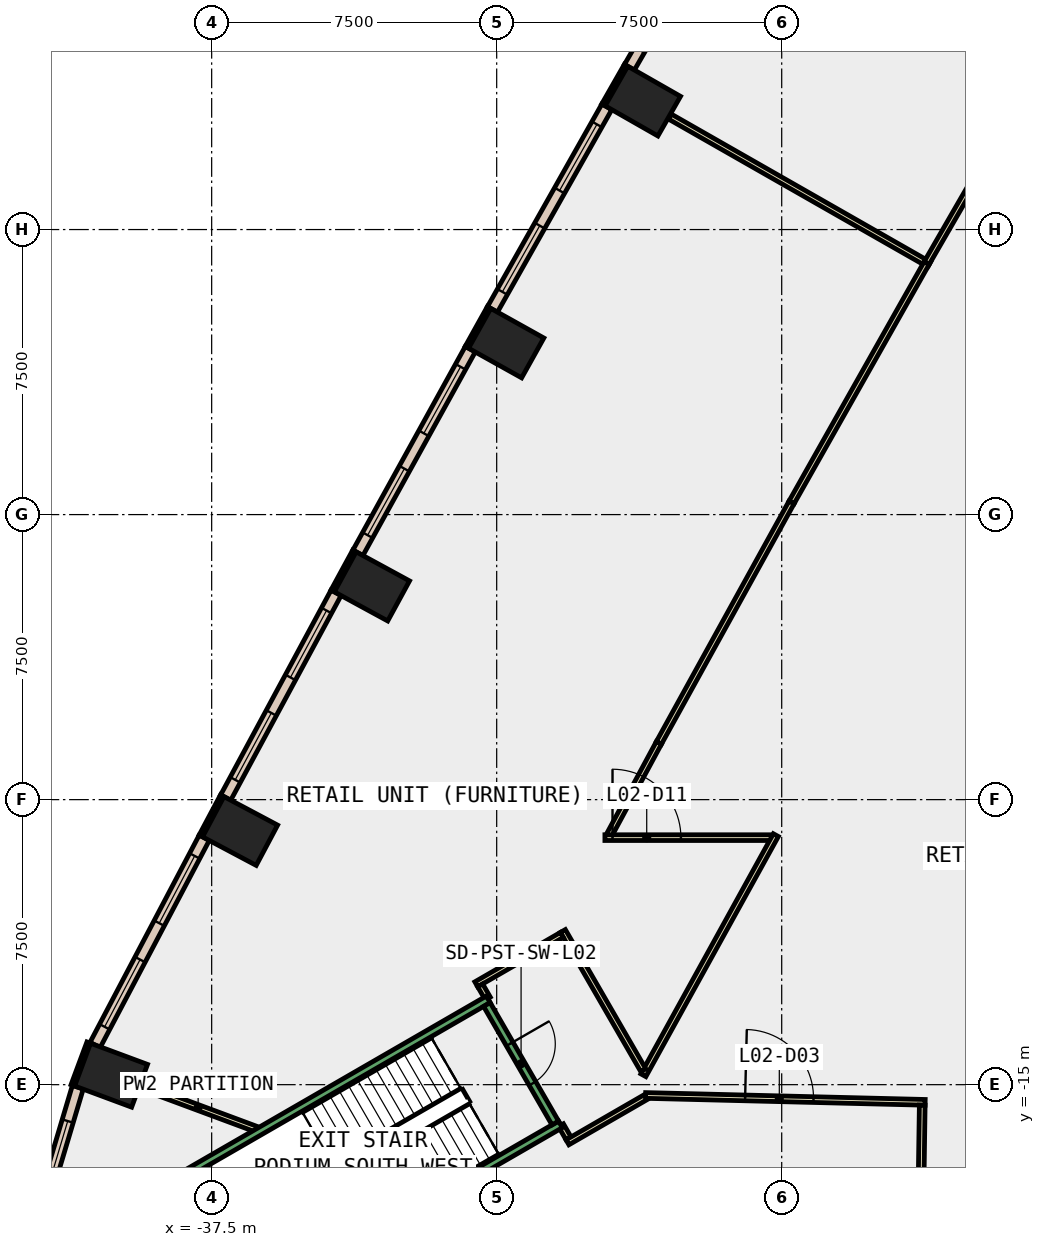
"""IFC4 building model, lengths in metres.
Left out: names, types, materials, properties, quantities, classifications, styles, units other than length and angle.
Written with IfcOpenShell. Run it as: python <this file> out.ifc"""

import sys

from ifc_helpers import new_model, si_unit, direction, frame, frame_2d, origin, origin_2d, place, context, subcontext, project, spatial, rectangle, extrude, element, fill, save


model = new_model("IFC4")
c1 = context("Model", 3, precision=1e-05, world=origin(), true_north=direction((0.0, 1.0)))
c2 = subcontext(c1, "Body", "Model", "MODEL_VIEW")
j1 = project(units=[si_unit("LENGTHUNIT", "METRE"), si_unit("PLANEANGLEUNIT", "RADIAN")], contexts=[c1])
p1 = place(None, origin())
s1 = spatial("IfcSite", under=j1, at=p1, CompositionType="ELEMENT")
p2 = place(p1, origin())
s2 = spatial("IfcBuilding", under=s1, at=p2, CompositionType="ELEMENT")
p3 = place(p2, frame((0.0, 0.0, 15.0)))
s3 = spatial("IfcBuildingStorey", under=s2, at=p3, CompositionType="ELEMENT", Elevation=15.0)
for number, where, z_axis, x_axis in (
    (1, (-26.155, 10.88, -0.45), (0.0, 0.0, 1.0), (0.496, 0.869, 0.0)),
    (2, (-29.75, 4.512, -0.45), (0.0, 0.0, 1.0), (0.487, 0.873, 0.0)),
    (3, (-33.283, -1.889, -0.45), (0.0, 0.0, 1.0), (0.478, 0.878, 0.0)),
    (4, (-36.753, -8.325, -0.45), (0.0, 0.0, 1.0), (0.469, 0.883, 0.0)),
    (5, (-40.147, -14.751, -0.45), (0.0, 0.0, 1.0), (0.348, 0.937, 0.0)),
):
    element("IfcColumn", number, at=place(p3, frame(where, z_axis=z_axis, x_axis=x_axis)), inside=s3, PredefinedType="COLUMN", context=c2, shape_type="SweptSolid", body=[
        extrude(rectangle(XDim=1.2, YDim=1.6, at=origin_2d()), origin(), (0.0, 0.0, 1.0), 5.0),
    ])
p4 = place(p3, frame((-26.596, 11.822, 0.0), z_axis=(0.0, 0.0, 1.0), x_axis=(-0.495854054996, -0.868405870629, 0.0)))
e6 = element("IfcWall", 6, at=p4, inside=s3, PredefinedType="STANDARD", context=c2, shape_type="SweptSolid", body=[
    extrude(rectangle(XDim=1.2, YDim=0.1, at=frame_2d((0.6, 0.0))), origin(), (0.0, 0.0, 1.0), 4.55),
])
p5 = place(p3, frame((-30.2, 5.45, 0.0), z_axis=(0.0, 0.0, 1.0), x_axis=(-0.486817526853, -0.873503689488, 0.0)))
e7 = element("IfcWall", 7, at=p5, inside=s3, PredefinedType="STANDARD", context=c2, shape_type="SweptSolid", body=[
    extrude(rectangle(XDim=1.2, YDim=0.1, at=frame_2d((0.6, 0.0))), origin(), (0.0, 0.0, 1.0), 4.55),
])
p6 = place(p3, frame((-33.742, -0.956, 0.0), z_axis=(0.0, 0.0, 1.0), x_axis=(-0.478267644701, -0.878214131082, 0.0)))
e8 = element("IfcWall", 8, at=p6, inside=s3, PredefinedType="STANDARD", context=c2, shape_type="SweptSolid", body=[
    extrude(rectangle(XDim=1.2, YDim=0.1, at=frame_2d((0.6, 0.0))), origin(), (0.0, 0.0, 1.0), 4.55),
])
p7 = place(p3, frame((-37.222, -7.397, 0.0), z_axis=(0.0, 0.0, 1.0), x_axis=(-0.469383408131, -0.882994459876, 0.0)))
e9 = element("IfcWall", 9, at=p7, inside=s3, PredefinedType="STANDARD", context=c2, shape_type="SweptSolid", body=[
    extrude(rectangle(XDim=1.199, YDim=0.1, at=frame_2d((0.6, 0.0))), origin(), (0.0, 0.0, 1.0), 4.55),
])
p8 = place(p3, frame((-40.735, -13.893, 0.0), z_axis=(0.0, 0.0, 1.0), x_axis=(-0.348268249601, -0.937394914814, 0.0)))
e10 = element("IfcWall", 10, at=p8, inside=s3, PredefinedType="STANDARD", context=c2, shape_type="SweptSolid", body=[
    extrude(rectangle(XDim=1.2, YDim=0.1, at=frame_2d((0.6, 0.0))), origin(), (0.0, 0.0, 1.0), 4.55),
])
p9 = place(p3, frame((-23.447, 17.071, 0.0), z_axis=(0.0, 0.0, 1.0), x_axis=(-0.499939977436, -0.866060055055, 0.0)))
e11 = element("IfcWall", 11, at=p9, inside=s3, PredefinedType="STANDARD", context=c2, shape_type="SweptSolid", body=[
    extrude(rectangle(XDim=6.121, YDim=0.3, at=frame_2d((3.061, 0.0))), origin(), (0.0, 0.0, 1.0), 4.55),
])
p10 = place(p9, frame((0.53, 0.0, 1.0)))
e12 = element("IfcOpeningElement", 12, at=p10, cuts=e11, PredefinedType="OPENING", context=c2, shape_type="SweptSolid", body=[
    extrude(rectangle(XDim=2.0, YDim=3.2, at=frame_2d((1.0, 1.6))), frame((0.0, 0.16, 0.0), z_axis=(0.0, -1.0, 0.0), x_axis=(1.0, 0.0, 0.0)), (0.0, 0.0, 1.0), 0.32),
])
p11 = place(p9, frame((3.591, 0.0, 1.0)))
e13 = element("IfcOpeningElement", 13, at=p11, cuts=e11, PredefinedType="OPENING", context=c2, shape_type="SweptSolid", body=[
    extrude(rectangle(XDim=2.0, YDim=3.2, at=frame_2d((1.0, 1.6))), frame((0.0, 0.16, 0.0), z_axis=(0.0, -1.0, 0.0), x_axis=(1.0, 0.0, 0.0)), (0.0, 0.0, 1.0), 0.32),
])
p12 = place(p3, frame((-27.101, 10.73, 0.0), z_axis=(0.0, 0.0, 1.0), x_axis=(-0.491661677717, -0.870786308267, 0.0)))
e14 = element("IfcWall", 14, at=p12, inside=s3, PredefinedType="STANDARD", context=c2, shape_type="SweptSolid", body=[
    extrude(rectangle(XDim=6.122, YDim=0.3, at=frame_2d((3.061, 0.0))), origin(), (0.0, 0.0, 1.0), 4.55),
])
p13 = place(p12, frame((0.531, 0.0, 1.0)))
e15 = element("IfcOpeningElement", 15, at=p13, cuts=e14, PredefinedType="OPENING", context=c2, shape_type="SweptSolid", body=[
    extrude(rectangle(XDim=2.0, YDim=3.2, at=frame_2d((1.0, 1.6))), frame((0.0, 0.16, 0.0), z_axis=(0.0, -1.0, 0.0), x_axis=(1.0, 0.0, 0.0)), (0.0, 0.0, 1.0), 0.32),
])
p14 = place(p12, frame((3.592, 0.0, 1.0)))
e16 = element("IfcOpeningElement", 16, at=p14, cuts=e14, PredefinedType="OPENING", context=c2, shape_type="SweptSolid", body=[
    extrude(rectangle(XDim=2.0, YDim=3.2, at=frame_2d((1.0, 1.6))), frame((0.0, 0.16, 0.0), z_axis=(0.0, -1.0, 0.0), x_axis=(1.0, 0.0, 0.0)), (0.0, 0.0, 1.0), 0.32),
])
p15 = place(p3, frame((-30.694, 4.353, 0.0), z_axis=(0.0, 0.0, 1.0), x_axis=(-0.483233380559, -0.875491576152, 0.0)))
e17 = element("IfcWall", 17, at=p15, inside=s3, PredefinedType="STANDARD", context=c2, shape_type="SweptSolid", body=[
    extrude(rectangle(XDim=6.121, YDim=0.3, at=frame_2d((3.061, 0.0))), origin(), (0.0, 0.0, 1.0), 4.55),
])
p16 = place(p15, frame((0.53, 0.0, 1.0)))
e18 = element("IfcOpeningElement", 18, at=p16, cuts=e17, PredefinedType="OPENING", context=c2, shape_type="SweptSolid", body=[
    extrude(rectangle(XDim=2.0, YDim=3.2, at=frame_2d((1.0, 1.6))), frame((0.0, 0.16, 0.0), z_axis=(0.0, -1.0, 0.0), x_axis=(1.0, 0.0, 0.0)), (0.0, 0.0, 1.0), 0.32),
])
p17 = place(p15, frame((3.591, 0.0, 1.0)))
e19 = element("IfcOpeningElement", 19, at=p17, cuts=e17, PredefinedType="OPENING", context=c2, shape_type="SweptSolid", body=[
    extrude(rectangle(XDim=2.0, YDim=3.2, at=frame_2d((1.0, 1.6))), frame((0.0, 0.16, 0.0), z_axis=(0.0, -1.0, 0.0), x_axis=(1.0, 0.0, 0.0)), (0.0, 0.0, 1.0), 0.32),
])
p18 = place(p3, frame((-34.226, -2.058, 0.0), z_axis=(0.0, 0.0, 1.0), x_axis=(-0.474584950749, -0.880209704856, 0.0)))
e20 = element("IfcWall", 20, at=p18, inside=s3, PredefinedType="STANDARD", context=c2, shape_type="SweptSolid", body=[
    extrude(rectangle(XDim=6.121, YDim=0.3, at=frame_2d((3.061, 0.0))), origin(), (0.0, 0.0, 1.0), 4.55),
])
p19 = place(p18, frame((0.53, 0.0, 1.0)))
e21 = element("IfcOpeningElement", 21, at=p19, cuts=e20, PredefinedType="OPENING", context=c2, shape_type="SweptSolid", body=[
    extrude(rectangle(XDim=2.0, YDim=3.2, at=frame_2d((1.0, 1.6))), frame((0.0, 0.16, 0.0), z_axis=(0.0, -1.0, 0.0), x_axis=(1.0, 0.0, 0.0)), (0.0, 0.0, 1.0), 0.32),
])
p20 = place(p18, frame((3.591, 0.0, 1.0)))
e22 = element("IfcOpeningElement", 22, at=p20, cuts=e20, PredefinedType="OPENING", context=c2, shape_type="SweptSolid", body=[
    extrude(rectangle(XDim=2.0, YDim=3.2, at=frame_2d((1.0, 1.6))), frame((0.0, 0.16, 0.0), z_axis=(0.0, -1.0, 0.0), x_axis=(1.0, 0.0, 0.0)), (0.0, 0.0, 1.0), 0.32),
])
p21 = place(p3, frame((-37.695, -8.503, 0.0), z_axis=(0.0, 0.0, 1.0), x_axis=(-0.466125129602, -0.884718804792, 0.0)))
e23 = element("IfcWall", 23, at=p21, inside=s3, PredefinedType="STANDARD", context=c2, shape_type="SweptSolid", body=[
    extrude(rectangle(XDim=6.164, YDim=0.3, at=frame_2d((3.082, 0.0))), origin(), (0.0, 0.0, 1.0), 4.55),
])
p22 = place(p21, frame((0.541, 0.0, 1.0)))
e24 = element("IfcOpeningElement", 24, at=p22, cuts=e23, PredefinedType="OPENING", context=c2, shape_type="SweptSolid", body=[
    extrude(rectangle(XDim=2.0, YDim=3.2, at=frame_2d((1.0, 1.6))), frame((0.0, 0.16, 0.0), z_axis=(0.0, -1.0, 0.0), x_axis=(1.0, 0.0, 0.0)), (0.0, 0.0, 1.0), 0.32),
])
p23 = place(p21, frame((3.623, 0.0, 1.0)))
e25 = element("IfcOpeningElement", 25, at=p23, cuts=e23, PredefinedType="OPENING", context=c2, shape_type="SweptSolid", body=[
    extrude(rectangle(XDim=2.0, YDim=3.2, at=frame_2d((1.0, 1.6))), frame((0.0, 0.16, 0.0), z_axis=(0.0, -1.0, 0.0), x_axis=(1.0, 0.0, 0.0)), (0.0, 0.0, 1.0), 0.32),
])
p24 = place(p3, frame((-41.022, -15.066, 0.0), z_axis=(0.0, 0.0, 1.0), x_axis=(-0.285800575124, -0.958289116738, 0.0)))
e26 = element("IfcWall", 26, at=p24, inside=s3, PredefinedType="STANDARD", context=c2, shape_type="SweptSolid", body=[
    extrude(rectangle(XDim=3.46, YDim=0.3, at=frame_2d((1.73, 0.0))), origin(), (0.0, 0.0, 1.0), 4.55),
])
p25 = place(p24, frame((0.93, 0.0, 1.0)))
e27 = element("IfcOpeningElement", 27, at=p25, cuts=e26, PredefinedType="OPENING", context=c2, shape_type="SweptSolid", body=[
    extrude(rectangle(XDim=1.6, YDim=3.2, at=frame_2d((0.8, 1.6))), frame((0.0, 0.16, 0.0), z_axis=(0.0, -1.0, 0.0), x_axis=(1.0, 0.0, 0.0)), (0.0, 0.0, 1.0), 0.32),
])
p26 = place(p3, frame((-39.378, -15.037, 0.0), z_axis=(0.0, 0.0, 1.0), x_axis=(0.937400028274, -0.348254485961, 0.0)))
e28 = element("IfcWall", 28, at=p26, inside=s3, PredefinedType="PARTITIONING", context=c2, shape_type="SweptSolid", body=[
    extrude(rectangle(XDim=3.247, YDim=0.15, at=frame_2d((1.624, 0.0))), origin(), (0.0, 0.0, 1.0), 4.55),
])
p27 = place(p3, frame((-28.309, -16.067, 0.0), z_axis=(0.0, 0.0, 1.0), x_axis=(0.499546646484, -0.86628698939, 0.0)))
e29 = element("IfcWall", 29, at=p27, inside=s3, PredefinedType="PARTITIONING", context=c2, shape_type="SweptSolid", body=[
    extrude(rectangle(XDim=0.401, YDim=0.15, at=frame_2d((0.2, 0.0))), origin(), (0.0, 0.0, 1.0), 4.55),
])
p28 = place(p3, frame((-28.137, -16.517, 0.0), z_axis=(0.0, 0.0, 1.0), x_axis=(0.865960610734, 0.500112208066, 0.0)))
e30 = element("IfcWall", 30, at=p28, inside=s3, PredefinedType="PARTITIONING", context=c2, shape_type="SweptSolid", body=[
    extrude(rectangle(XDim=2.386, YDim=0.15, at=frame_2d((1.193, 0.0))), origin(), (0.0, 0.0, 1.0), 4.55),
])
p29 = place(p3, frame((-26.081, -15.284, 0.0), z_axis=(0.0, 0.0, 1.0), x_axis=(0.999696822244, -0.02462242057, 0.0)))
e31 = element("IfcWall", 31, at=p29, inside=s3, PredefinedType="PARTITIONING", context=c2, shape_type="SweptSolid", body=[
    extrude(rectangle(XDim=7.357, YDim=0.15, at=frame_2d((3.679, 0.0))), origin(), (0.0, 0.0, 1.0), 4.55),
])
p30 = place(p29, frame((2.619, 0.0, 0.0)))
e32 = element("IfcOpeningElement", 32, at=p30, cuts=e31, PredefinedType="OPENING", context=c2, shape_type="SweptSolid", body=[
    extrude(rectangle(XDim=1.8, YDim=2.1, at=frame_2d((0.9, 1.05))), frame((0.0, 0.085, 0.0), z_axis=(0.0, -1.0, 0.0), x_axis=(1.0, 0.0, 0.0)), (0.0, 0.0, 1.0), 0.17),
])
p31 = place(p3, frame((-18.802, -15.538, 0.0), z_axis=(0.0, 0.0, 1.0), x_axis=(-0.014792283123, -0.999890588195, 0.0)))
e33 = element("IfcWall", 33, at=p31, inside=s3, PredefinedType="PARTITIONING", context=c2, shape_type="SweptSolid", body=[
    extrude(rectangle(XDim=2.162, YDim=0.15, at=frame_2d((1.081, 0.0))), origin(), (0.0, 0.0, 1.0), 4.55),
])
p32 = place(p3, frame((-18.621, 6.58, 0.0), z_axis=(0.0, 0.0, 1.0), x_axis=(-0.86854328957, 0.495613311104, 0.0)))
e34 = element("IfcWall", 34, at=p32, inside=s3, PredefinedType="PARTITIONING", context=c2, shape_type="SweptSolid", body=[
    extrude(rectangle(XDim=7.854, YDim=0.15, at=frame_2d((3.927, 0.0))), origin(), (0.0, 0.0, 1.0), 4.55),
])
p33 = place(p3, frame((-15.834, 11.556, 0.0), z_axis=(0.0, 0.0, 1.0), x_axis=(-0.500070759958, -0.865984546649, 0.0)))
e35 = element("IfcWall", 35, at=p33, inside=s3, PredefinedType="PARTITIONING", context=c2, shape_type="SweptSolid", body=[
    extrude(rectangle(XDim=5.703, YDim=0.15, at=frame_2d((2.852, 0.0))), origin(), (0.0, 0.0, 1.0), 4.55),
])
p34 = place(p3, frame((-18.687, 6.616, 0.0), z_axis=(0.0, 0.0, 1.0), x_axis=(-0.491575368277, -0.870835034494, 0.0)))
e36 = element("IfcWall", 36, at=p34, inside=s3, PredefinedType="PARTITIONING", context=c2, shape_type="SweptSolid", body=[
    extrude(rectangle(XDim=7.23, YDim=0.15, at=frame_2d((3.615, 0.0))), origin(), (0.0, 0.0, 1.0), 4.55),
])
p35 = place(p3, frame((-22.241, 0.32, 0.0), z_axis=(0.0, 0.0, 1.0), x_axis=(-0.483080021489, -0.875576206186, 0.0)))
e37 = element("IfcWall", 37, at=p35, inside=s3, PredefinedType="PARTITIONING", context=c2, shape_type="SweptSolid", body=[
    extrude(rectangle(XDim=7.229, YDim=0.15, at=frame_2d((3.614, 0.0))), origin(), (0.0, 0.0, 1.0), 4.55),
])
p36 = place(p3, frame((-25.733, -6.009, 0.0), z_axis=(0.0, 0.0, 1.0), x_axis=(-0.474749604856, -0.880120907995, 0.0)))
e38 = element("IfcWall", 38, at=p36, inside=s3, PredefinedType="PARTITIONING", context=c2, shape_type="SweptSolid", body=[
    extrude(rectangle(XDim=2.755, YDim=0.15, at=frame_2d((1.378, 0.0))), origin(), (0.0, 0.0, 1.0), 4.55),
])
p37 = place(p3, frame((-27.152, -8.5, 0.0), z_axis=(0.0, 0.0, 1.0), x_axis=(1.0, 0.0, 0.0)))
e39 = element("IfcWall", 39, at=p37, inside=s3, PredefinedType="PARTITIONING", context=c2, shape_type="SweptSolid", body=[
    extrude(rectangle(XDim=4.387, YDim=0.15, at=frame_2d((2.194, 0.0))), origin(), (0.0, 0.0, 1.0), 4.55),
])
p38 = place(p37, frame((0.2, 0.0, 0.0)))
e40 = element("IfcOpeningElement", 40, at=p38, cuts=e39, PredefinedType="OPENING", context=c2, shape_type="SweptSolid", body=[
    extrude(rectangle(XDim=1.8, YDim=2.1, at=frame_2d((0.9, 1.05))), frame((0.0, 0.085, 0.0), z_axis=(0.0, -1.0, 0.0), x_axis=(1.0, 0.0, 0.0)), (0.0, 0.0, 1.0), 0.17),
])
p39 = place(p3, frame((-22.654, -8.434, 0.0), z_axis=(0.0, 0.0, 1.0), x_axis=(-0.483089865042, -0.875570775148, 0.0)))
e41 = element("IfcWall", 41, at=p39, inside=s3, PredefinedType="PARTITIONING", context=c2, shape_type="SweptSolid", body=[
    extrude(rectangle(XDim=7.216, YDim=0.15, at=frame_2d((3.608, 0.0))), origin(), (0.0, 0.0, 1.0), 4.55),
])
p40 = place(p3, frame((-26.142, -14.621, 0.0), z_axis=(0.0, 0.0, 1.0), x_axis=(-0.500092051157, 0.865972251501, 0.0)))
e42 = element("IfcWall", 42, at=p40, inside=s3, PredefinedType="PARTITIONING", context=c2, shape_type="SweptSolid", body=[
    extrude(rectangle(XDim=4.231, YDim=0.15, at=frame_2d((2.116, 0.0))), origin(), (0.0, 0.0, 1.0), 4.55),
])
p41 = place(p3, frame((-28.285, -11.059, 0.0), z_axis=(0.0, 0.0, 1.0), x_axis=(-0.866108986466, -0.499855202596, 0.0)))
e43 = element("IfcWall", 43, at=p41, inside=s3, PredefinedType="PARTITIONING", context=c2, shape_type="SweptSolid", body=[
    extrude(rectangle(XDim=2.6, YDim=0.15, at=frame_2d((1.3, 0.0))), origin(), (0.0, 0.0, 1.0), 4.55),
])
p42 = place(p3, frame((-30.434, -12.387, 0.0), z_axis=(0.0, 0.0, 1.0), x_axis=(0.500867716848, -0.865523847285, 0.0)))
e44 = element("IfcWall", 44, at=p42, inside=s3, PredefinedType="PARTITIONING", context=c2, shape_type="SweptSolid", body=[
    extrude(rectangle(XDim=0.4, YDim=0.15, at=frame_2d((0.2, 0.0))), origin(), (0.0, 0.0, 1.0), 4.55),
])
for number, where, z_axis, x_axis in (
    (45, (-30.222, -12.755, 0.0), (0.0, 0.0, 1.0), (-0.866, -0.5, 0.0)),
    (46, (-28.322, -16.045, 0.0), (0.0, 0.0, 1.0), (-0.866, -0.5, 0.0)),
):
    element("IfcWall", number, at=place(p3, frame(where, z_axis=z_axis, x_axis=x_axis)), inside=s3, PredefinedType="STANDARD", context=c2, shape_type="SweptSolid", body=[
        extrude(rectangle(XDim=9.8, YDim=0.2, at=frame_2d((4.9, 0.0))), origin(), (0.0, 0.0, 1.0), 4.55),
    ])
p43 = place(p3, frame((-30.258, -12.891, 0.0), z_axis=(0.0, 0.0, 1.0), x_axis=(0.499982693035, -0.866035395735, 0.0)))
e47 = element("IfcWall", 47, at=p43, inside=s3, PredefinedType="STANDARD", context=c2, shape_type="SweptSolid", body=[
    extrude(rectangle(XDim=3.6, YDim=0.2, at=frame_2d((1.8, 0.0))), origin(), (0.0, 0.0, 1.0), 4.55),
])
p44 = place(p43, frame((1.2, 0.0, 0.0)))
e48 = element("IfcOpeningElement", 48, at=p44, cuts=e47, PredefinedType="OPENING", context=c2, shape_type="SweptSolid", body=[
    extrude(rectangle(XDim=1.2, YDim=2.2, at=frame_2d((0.6, 1.1))), frame((0.0, 0.11, 0.0), z_axis=(0.0, -1.0, 0.0), x_axis=(1.0, 0.0, 0.0)), (0.0, 0.0, 1.0), 0.22),
])
p45 = place(p13, origin())
e49 = element("IfcWindow", 49, at=p45, inside=s3, PartitioningType="SINGLE_PANEL", PredefinedType="WINDOW", context=c2, shape_type="SweptSolid", body=[
    extrude(rectangle(XDim=2.0, YDim=3.2, at=frame_2d((1.0, 1.6))), frame((0.0, 0.03, 0.0), z_axis=(0.0, -1.0, 0.0), x_axis=(1.0, 0.0, 0.0)), (0.0, 0.0, 1.0), 0.06),
])
fill(e15, e49)
p46 = place(p14, origin())
e50 = element("IfcWindow", 50, at=p46, inside=s3, PartitioningType="SINGLE_PANEL", PredefinedType="WINDOW", context=c2, shape_type="SweptSolid", body=[
    extrude(rectangle(XDim=2.0, YDim=3.2, at=frame_2d((1.0, 1.6))), frame((0.0, 0.03, 0.0), z_axis=(0.0, -1.0, 0.0), x_axis=(1.0, 0.0, 0.0)), (0.0, 0.0, 1.0), 0.06),
])
fill(e16, e50)
p47 = place(p16, origin())
e51 = element("IfcWindow", 51, at=p47, inside=s3, PartitioningType="SINGLE_PANEL", PredefinedType="WINDOW", context=c2, shape_type="SweptSolid", body=[
    extrude(rectangle(XDim=2.0, YDim=3.2, at=frame_2d((1.0, 1.6))), frame((0.0, 0.03, 0.0), z_axis=(0.0, -1.0, 0.0), x_axis=(1.0, 0.0, 0.0)), (0.0, 0.0, 1.0), 0.06),
])
fill(e18, e51)
p48 = place(p17, origin())
e52 = element("IfcWindow", 52, at=p48, inside=s3, PartitioningType="SINGLE_PANEL", PredefinedType="WINDOW", context=c2, shape_type="SweptSolid", body=[
    extrude(rectangle(XDim=2.0, YDim=3.2, at=frame_2d((1.0, 1.6))), frame((0.0, 0.03, 0.0), z_axis=(0.0, -1.0, 0.0), x_axis=(1.0, 0.0, 0.0)), (0.0, 0.0, 1.0), 0.06),
])
fill(e19, e52)
p49 = place(p19, origin())
e53 = element("IfcWindow", 53, at=p49, inside=s3, PartitioningType="SINGLE_PANEL", PredefinedType="WINDOW", context=c2, shape_type="SweptSolid", body=[
    extrude(rectangle(XDim=2.0, YDim=3.2, at=frame_2d((1.0, 1.6))), frame((0.0, 0.03, 0.0), z_axis=(0.0, -1.0, 0.0), x_axis=(1.0, 0.0, 0.0)), (0.0, 0.0, 1.0), 0.06),
])
fill(e21, e53)
p50 = place(p20, origin())
e54 = element("IfcWindow", 54, at=p50, inside=s3, PartitioningType="SINGLE_PANEL", PredefinedType="WINDOW", context=c2, shape_type="SweptSolid", body=[
    extrude(rectangle(XDim=2.0, YDim=3.2, at=frame_2d((1.0, 1.6))), frame((0.0, 0.03, 0.0), z_axis=(0.0, -1.0, 0.0), x_axis=(1.0, 0.0, 0.0)), (0.0, 0.0, 1.0), 0.06),
])
fill(e22, e54)
p51 = place(p22, origin())
e55 = element("IfcWindow", 55, at=p51, inside=s3, PartitioningType="SINGLE_PANEL", PredefinedType="WINDOW", context=c2, shape_type="SweptSolid", body=[
    extrude(rectangle(XDim=2.0, YDim=3.2, at=frame_2d((1.0, 1.6))), frame((0.0, 0.03, 0.0), z_axis=(0.0, -1.0, 0.0), x_axis=(1.0, 0.0, 0.0)), (0.0, 0.0, 1.0), 0.06),
])
fill(e24, e55)
p52 = place(p23, origin())
e56 = element("IfcWindow", 56, at=p52, inside=s3, PartitioningType="SINGLE_PANEL", PredefinedType="WINDOW", context=c2, shape_type="SweptSolid", body=[
    extrude(rectangle(XDim=2.0, YDim=3.2, at=frame_2d((1.0, 1.6))), frame((0.0, 0.03, 0.0), z_axis=(0.0, -1.0, 0.0), x_axis=(1.0, 0.0, 0.0)), (0.0, 0.0, 1.0), 0.06),
])
fill(e25, e56)
p53 = place(p25, origin())
e57 = element("IfcWindow", 57, at=p53, inside=s3, PartitioningType="SINGLE_PANEL", PredefinedType="WINDOW", context=c2, shape_type="SweptSolid", body=[
    extrude(rectangle(XDim=1.6, YDim=3.2, at=frame_2d((0.8, 1.6))), frame((0.0, 0.03, 0.0), z_axis=(0.0, -1.0, 0.0), x_axis=(1.0, 0.0, 0.0)), (0.0, 0.0, 1.0), 0.06),
])
fill(e27, e57)
p54 = place(p30, origin())
e58 = element("IfcDoor", 58, at=p54, inside=s3, OperationType="DOUBLE_DOOR_SINGLE_SWING", PredefinedType="DOOR", context=c2, shape_type="SweptSolid", body=[
    extrude(rectangle(XDim=1.8, YDim=2.1, at=frame_2d((0.9, 1.05))), frame((0.0, 0.025, 0.0), z_axis=(0.0, -1.0, 0.0), x_axis=(1.0, 0.0, 0.0)), (0.0, 0.0, 1.0), 0.05),
])
fill(e32, e58)
p55 = place(p38, origin())
e59 = element("IfcDoor", 59, at=p55, inside=s3, OperationType="DOUBLE_DOOR_SINGLE_SWING", PredefinedType="DOOR", context=c2, shape_type="SweptSolid", body=[
    extrude(rectangle(XDim=1.8, YDim=2.1, at=frame_2d((0.9, 1.05))), frame((0.0, 0.025, 0.0), z_axis=(0.0, -1.0, 0.0), x_axis=(1.0, 0.0, 0.0)), (0.0, 0.0, 1.0), 0.05),
])
fill(e40, e59)
p56 = place(p44, origin())
e60 = element("IfcDoor", 60, at=p56, inside=s3, OperationType="SINGLE_SWING_LEFT", PredefinedType="DOOR", context=c2, shape_type="SweptSolid", body=[
    extrude(rectangle(XDim=1.2, YDim=2.2, at=frame_2d((0.6, 1.1))), frame((0.0, 0.025, 0.0), z_axis=(0.0, -1.0, 0.0), x_axis=(1.0, 0.0, 0.0)), (0.0, 0.0, 1.0), 0.05),
])
fill(e48, e60)
save(model, sys.argv[1])
